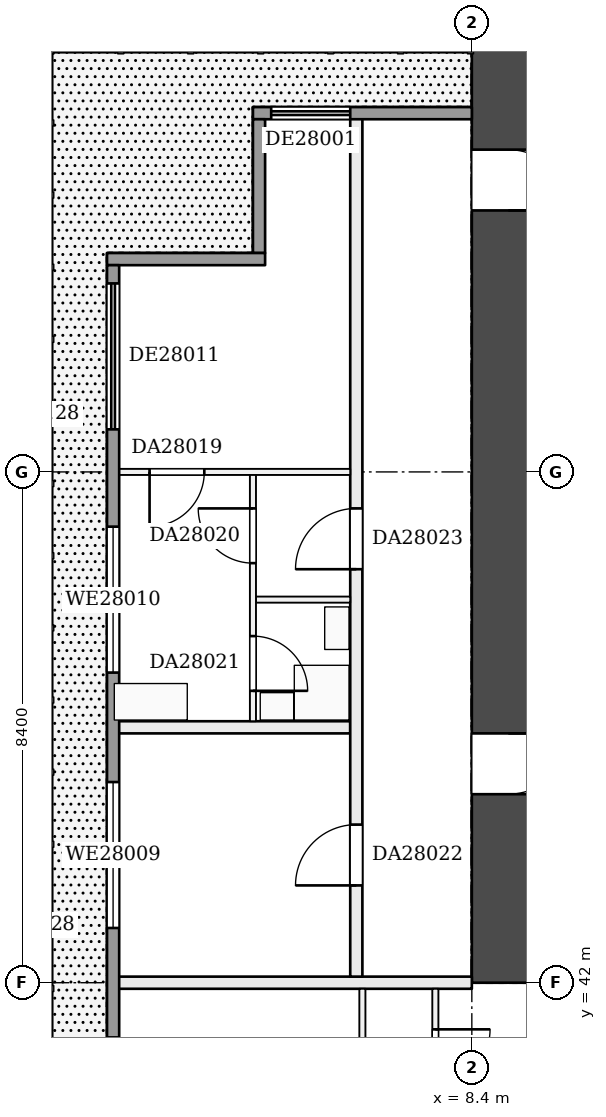
"""IFC4 building model, lengths in metres.
Left out: names, types, materials, properties, quantities, classifications, styles, units other than length and angle.
Written with IfcOpenShell. Run it as: python <this file> out.ifc"""

import sys

from ifc_helpers import new_model, si_unit, direction, frame, frame_2d, origin, place, context, subcontext, project, spatial, rectangle, extrude, element, fill, save


model = new_model("IFC4")
c1 = context("Model", 3, precision=1e-05, world=origin(), true_north=direction((0.0, 1.0)))
c2 = subcontext(c1, "Body", "Model", "MODEL_VIEW")
j1 = project(units=[si_unit("LENGTHUNIT", "METRE"), si_unit("PLANEANGLEUNIT", "RADIAN")], contexts=[c1])
p1 = place(None, origin())
s1 = spatial("IfcSite", under=j1, at=p1, CompositionType="ELEMENT")
p2 = place(p1, origin())
s2 = spatial("IfcBuilding", under=s1, at=p2, CompositionType="ELEMENT")
p3 = place(p2, frame((0.0, 0.0, 112.7)))
s3 = spatial("IfcBuildingStorey", under=s2, at=p3, CompositionType="ELEMENT", Elevation=112.7)
p4 = place(p3, frame((9.0, 58.8, 0.0), z_axis=(0.0, 0.0, 1.0), x_axis=(0.0, -1.0, 0.0)))
e1 = element("IfcWall", 1, at=p4, inside=s3, PredefinedType="SHEAR", context=c2, shape_type="SweptSolid", body=[
    extrude(rectangle(XDim=16.8, YDim=1.2, at=frame_2d((8.4, 0.0))), origin(), (0.0, 0.0, 1.0), 3.22),
])
p5 = place(p4, frame((3.1, 0.0, 0.0)))
e2 = element("IfcOpeningElement", 2, at=p5, cuts=e1, PredefinedType="OPENING", context=c2, shape_type="SweptSolid", body=[
    extrude(rectangle(XDim=1.0, YDim=2.1, at=frame_2d((0.5, 1.05))), frame((0.0, 0.61, 0.0), z_axis=(0.0, -1.0, 0.0), x_axis=(1.0, 0.0, 0.0)), (0.0, 0.0, 1.0), 1.22),
])
p6 = place(p4, frame((12.7, 0.0, 0.0)))
e3 = element("IfcOpeningElement", 3, at=p6, cuts=e1, PredefinedType="OPENING", context=c2, shape_type="SweptSolid", body=[
    extrude(rectangle(XDim=1.0, YDim=2.1, at=frame_2d((0.5, 1.05))), frame((0.0, 0.61, 0.0), z_axis=(0.0, -1.0, 0.0), x_axis=(1.0, 0.0, 0.0)), (0.0, 0.0, 1.0), 1.22),
])
p7 = place(p3, frame((2.5, 42.0, 0.0), z_axis=(0.0, 0.0, 1.0), x_axis=(1.0, 0.0, 0.0)))
e4 = element("IfcWall", 4, at=p7, inside=s3, PredefinedType="PARTITIONING", context=c2, shape_type="SweptSolid", body=[
    extrude(rectangle(XDim=5.9, YDim=0.2, at=frame_2d((2.95, 0.0))), origin(), (0.0, 0.0, 1.0), 3.22),
])
p8 = place(p3, frame((2.5, 46.2, 0.0), z_axis=(0.0, 0.0, 1.0), x_axis=(1.0, 0.0, 0.0)))
e5 = element("IfcWall", 5, at=p8, inside=s3, PredefinedType="PARTITIONING", context=c2, shape_type="SweptSolid", body=[
    extrude(rectangle(XDim=3.9, YDim=0.2, at=frame_2d((1.95, 0.0))), origin(), (0.0, 0.0, 1.0), 3.22),
])
p9 = place(p3, frame((4.85, 48.3, 0.0), z_axis=(0.0, 0.0, 1.0), x_axis=(1.0, 0.0, 0.0)))
e6 = element("IfcWall", 6, at=p9, inside=s3, PredefinedType="PARTITIONING", context=c2, shape_type="SweptSolid", body=[
    extrude(rectangle(XDim=1.55, YDim=0.1, at=frame_2d((0.775, 0.0))), origin(), (0.0, 0.0, 1.0), 3.22),
])
p10 = place(p3, frame((2.5, 50.4, 0.0), z_axis=(0.0, 0.0, 1.0), x_axis=(1.0, 0.0, 0.0)))
e7 = element("IfcWall", 7, at=p10, inside=s3, PredefinedType="PARTITIONING", context=c2, shape_type="SweptSolid", body=[
    extrude(rectangle(XDim=3.9, YDim=0.1, at=frame_2d((1.95, 0.0))), origin(), (0.0, 0.0, 1.0), 3.22),
])
p11 = place(p10, frame((0.6, 0.0, 0.0)))
e8 = element("IfcOpeningElement", 8, at=p11, cuts=e7, PredefinedType="OPENING", context=c2, shape_type="SweptSolid", body=[
    extrude(rectangle(XDim=0.9, YDim=2.1, at=frame_2d((0.45, 1.05))), frame((0.0, 0.06, 0.0), z_axis=(0.0, -1.0, 0.0), x_axis=(1.0, 0.0, 0.0)), (0.0, 0.0, 1.0), 0.12),
])
p12 = place(p3, frame((4.8, 46.3, 0.0), z_axis=(0.0, 0.0, 1.0), x_axis=(0.0, 1.0, 0.0)))
e9 = element("IfcWall", 9, at=p12, inside=s3, PredefinedType="PARTITIONING", context=c2, shape_type="SweptSolid", body=[
    extrude(rectangle(XDim=4.05, YDim=0.1, at=frame_2d((2.025, 0.0))), origin(), (0.0, 0.0, 1.0), 3.22),
])
p13 = place(p12, frame((2.6, 0.0, 0.0)))
e10 = element("IfcOpeningElement", 10, at=p13, cuts=e9, PredefinedType="OPENING", context=c2, shape_type="SweptSolid", body=[
    extrude(rectangle(XDim=0.9, YDim=2.1, at=frame_2d((0.45, 1.05))), frame((0.0, 0.06, 0.0), z_axis=(0.0, -1.0, 0.0), x_axis=(1.0, 0.0, 0.0)), (0.0, 0.0, 1.0), 0.12),
])
p14 = place(p12, frame((0.5, 0.0, 0.0)))
e11 = element("IfcOpeningElement", 11, at=p14, cuts=e9, PredefinedType="OPENING", context=c2, shape_type="SweptSolid", body=[
    extrude(rectangle(XDim=0.9, YDim=2.1, at=frame_2d((0.45, 1.05))), frame((0.0, 0.06, 0.0), z_axis=(0.0, -1.0, 0.0), x_axis=(1.0, 0.0, 0.0)), (0.0, 0.0, 1.0), 0.12),
])
p15 = place(p3, frame((6.5, 42.1, 0.0), z_axis=(0.0, 0.0, 1.0), x_axis=(0.0, 1.0, 0.0)))
e12 = element("IfcWall", 12, at=p15, inside=s3, PredefinedType="PARTITIONING", context=c2, shape_type="SweptSolid", body=[
    extrude(rectangle(XDim=14.2, YDim=0.2, at=frame_2d((7.1, 0.0))), origin(), (0.0, 0.0, 1.0), 3.22),
])
p16 = place(p15, frame((1.5, 0.0, 0.0)))
e13 = element("IfcOpeningElement", 13, at=p16, cuts=e12, PredefinedType="OPENING", context=c2, shape_type="SweptSolid", body=[
    extrude(rectangle(XDim=1.0, YDim=2.1, at=frame_2d((0.5, 1.05))), frame((0.0, 0.11, 0.0), z_axis=(0.0, -1.0, 0.0), x_axis=(1.0, 0.0, 0.0)), (0.0, 0.0, 1.0), 0.22),
])
p17 = place(p15, frame((6.7, 0.0, 0.0)))
e14 = element("IfcOpeningElement", 14, at=p17, cuts=e12, PredefinedType="OPENING", context=c2, shape_type="SweptSolid", body=[
    extrude(rectangle(XDim=1.0, YDim=2.1, at=frame_2d((0.5, 1.05))), frame((0.0, 0.11, 0.0), z_axis=(0.0, -1.0, 0.0), x_axis=(1.0, 0.0, 0.0)), (0.0, 0.0, 1.0), 0.22),
])
p18 = place(p3, frame((6.6, 16.85, 0.0), z_axis=(0.0, 0.0, 1.0), x_axis=(0.0, 1.0, 0.0)))
e15 = element("IfcWall", 15, at=p18, inside=s3, PredefinedType="PARTITIONING", context=c2, shape_type="SweptSolid", body=[
    extrude(rectangle(XDim=25.05, YDim=0.1, at=frame_2d((12.525, 0.0))), origin(), (0.0, 0.0, 1.0), 3.22),
])
p19 = place(p18, frame((1.55, 0.0, 0.0)))
e16 = element("IfcOpeningElement", 16, at=p19, cuts=e15, PredefinedType="OPENING", context=c2, shape_type="SweptSolid", body=[
    extrude(rectangle(XDim=0.9, YDim=2.1, at=frame_2d((0.45, 1.05))), frame((0.0, 0.06, 0.0), z_axis=(0.0, -1.0, 0.0), x_axis=(1.0, 0.0, 0.0)), (0.0, 0.0, 1.0), 0.12),
])
p20 = place(p18, frame((7.15, 0.0, 0.0)))
e17 = element("IfcOpeningElement", 17, at=p20, cuts=e15, PredefinedType="OPENING", context=c2, shape_type="SweptSolid", body=[
    extrude(rectangle(XDim=0.9, YDim=2.1, at=frame_2d((0.45, 1.05))), frame((0.0, 0.06, 0.0), z_axis=(0.0, -1.0, 0.0), x_axis=(1.0, 0.0, 0.0)), (0.0, 0.0, 1.0), 0.12),
])
p21 = place(p18, frame((14.15, 0.0, 0.0)))
e18 = element("IfcOpeningElement", 18, at=p21, cuts=e15, PredefinedType="OPENING", context=c2, shape_type="SweptSolid", body=[
    extrude(rectangle(XDim=0.9, YDim=2.1, at=frame_2d((0.45, 1.05))), frame((0.0, 0.06, 0.0), z_axis=(0.0, -1.0, 0.0), x_axis=(1.0, 0.0, 0.0)), (0.0, 0.0, 1.0), 0.12),
])
p22 = place(p18, frame((18.35, 0.0, 0.0)))
e19 = element("IfcOpeningElement", 19, at=p22, cuts=e15, PredefinedType="OPENING", context=c2, shape_type="SweptSolid", body=[
    extrude(rectangle(XDim=0.9, YDim=2.1, at=frame_2d((0.45, 1.05))), frame((0.0, 0.06, 0.0), z_axis=(0.0, -1.0, 0.0), x_axis=(1.0, 0.0, 0.0)), (0.0, 0.0, 1.0), 0.12),
])
p23 = place(p18, frame((22.55, 0.0, 0.0)))
e20 = element("IfcOpeningElement", 20, at=p23, cuts=e15, PredefinedType="OPENING", context=c2, shape_type="SweptSolid", body=[
    extrude(rectangle(XDim=0.9, YDim=2.1, at=frame_2d((0.45, 1.05))), frame((0.0, 0.06, 0.0), z_axis=(0.0, -1.0, 0.0), x_axis=(1.0, 0.0, 0.0)), (0.0, 0.0, 1.0), 0.12),
])
p24 = place(p3, frame((7.8, 33.7, 0.0), z_axis=(0.0, 0.0, 1.0), x_axis=(0.0, 1.0, 0.0)))
e21 = element("IfcWall", 21, at=p24, inside=s3, PredefinedType="PARTITIONING", context=c2, shape_type="SweptSolid", body=[
    extrude(rectangle(XDim=8.2, YDim=0.1, at=frame_2d((4.1, 0.0))), origin(), (0.0, 0.0, 1.0), 3.22),
])
p25 = place(p24, frame((6.633, 0.0, 0.0)))
e22 = element("IfcOpeningElement", 22, at=p25, cuts=e21, PredefinedType="OPENING", context=c2, shape_type="SweptSolid", body=[
    extrude(rectangle(XDim=0.9, YDim=2.1, at=frame_2d((0.45, 1.05))), frame((0.0, 0.06, 0.0), z_axis=(0.0, -1.0, 0.0), x_axis=(1.0, 0.0, 0.0)), (0.0, 0.0, 1.0), 0.12),
])
p26 = place(p24, frame((0.8, 0.0, 0.0)))
e23 = element("IfcOpeningElement", 23, at=p26, cuts=e21, PredefinedType="OPENING", context=c2, shape_type="SweptSolid", body=[
    extrude(rectangle(XDim=0.9, YDim=2.1, at=frame_2d((0.45, 1.05))), frame((0.0, 0.06, 0.0), z_axis=(0.0, -1.0, 0.0), x_axis=(1.0, 0.0, 0.0)), (0.0, 0.0, 1.0), 0.12),
])
p27 = place(p24, frame((3.767, 0.0, 0.0)))
e24 = element("IfcOpeningElement", 24, at=p27, cuts=e21, PredefinedType="OPENING", context=c2, shape_type="SweptSolid", body=[
    extrude(rectangle(XDim=0.9, YDim=2.1, at=frame_2d((0.45, 1.05))), frame((0.0, 0.06, 0.0), z_axis=(0.0, -1.0, 0.0), x_axis=(1.0, 0.0, 0.0)), (0.0, 0.0, 1.0), 0.12),
])
p28 = place(p3, frame((8.4, 56.3, 0.0), z_axis=(0.0, 0.0, 1.0), x_axis=(-1.0, 0.0, 0.0)))
e25 = element("IfcWall", 25, at=p28, inside=s3, PredefinedType="SOLIDWALL", context=c2, shape_type="SweptSolid", body=[
    extrude(rectangle(XDim=3.6, YDim=0.2, at=frame_2d((1.8, 0.0))), origin(), (0.0, 0.0, 1.0), 3.22),
])
p29 = place(p28, frame((2.0, 0.0, 0.0)))
e26 = element("IfcOpeningElement", 26, at=p29, cuts=e25, PredefinedType="OPENING", context=c2, shape_type="SweptSolid", body=[
    extrude(rectangle(XDim=1.3, YDim=2.2, at=frame_2d((0.65, 1.1))), frame((0.0, 0.11, 0.0), z_axis=(0.0, -1.0, 0.0), x_axis=(1.0, 0.0, 0.0)), (0.0, 0.0, 1.0), 0.22),
])
p30 = place(p3, frame((4.9, 56.2, 0.0), z_axis=(0.0, 0.0, 1.0), x_axis=(0.0, -1.0, 0.0)))
e27 = element("IfcWall", 27, at=p30, inside=s3, PredefinedType="SOLIDWALL", context=c2, shape_type="SweptSolid", body=[
    extrude(rectangle(XDim=2.2, YDim=0.2, at=frame_2d((1.1, 0.0))), origin(), (0.0, 0.0, 1.0), 3.22),
])
p31 = place(p3, frame((5.0, 53.9, 0.0), z_axis=(0.0, 0.0, 1.0), x_axis=(-1.0, 0.0, 0.0)))
e28 = element("IfcWall", 28, at=p31, inside=s3, PredefinedType="SOLIDWALL", context=c2, shape_type="SweptSolid", body=[
    extrude(rectangle(XDim=2.6, YDim=0.2, at=frame_2d((1.3, 0.0))), origin(), (0.0, 0.0, 1.0), 3.22),
])
p32 = place(p3, frame((2.5, 53.8, 0.0), z_axis=(0.0, 0.0, 1.0), x_axis=(0.0, -1.0, 0.0)))
e29 = element("IfcWall", 29, at=p32, inside=s3, PredefinedType="SOLIDWALL", context=c2, shape_type="SweptSolid", body=[
    extrude(rectangle(XDim=40.4, YDim=0.2, at=frame_2d((20.2, 0.0))), origin(), (0.0, 0.0, 1.0), 3.22),
])
p33 = place(p32, frame((37.7, 0.0, 0.9)))
e30 = element("IfcOpeningElement", 30, at=p33, cuts=e29, PredefinedType="OPENING", context=c2, shape_type="SweptSolid", body=[
    extrude(rectangle(XDim=2.4, YDim=1.5, at=frame_2d((1.2, 0.75))), frame((0.0, 0.11, 0.0), z_axis=(0.0, -1.0, 0.0), x_axis=(1.0, 0.0, 0.0)), (0.0, 0.0, 1.0), 0.22),
])
p34 = place(p32, frame((33.7, 0.0, 0.9)))
e31 = element("IfcOpeningElement", 31, at=p34, cuts=e29, PredefinedType="OPENING", context=c2, shape_type="SweptSolid", body=[
    extrude(rectangle(XDim=2.4, YDim=1.5, at=frame_2d((1.2, 0.75))), frame((0.0, 0.11, 0.0), z_axis=(0.0, -1.0, 0.0), x_axis=(1.0, 0.0, 0.0)), (0.0, 0.0, 1.0), 0.22),
])
p35 = place(p32, frame((29.5, 0.0, 0.0)))
e32 = element("IfcOpeningElement", 32, at=p35, cuts=e29, PredefinedType="OPENING", context=c2, shape_type="SweptSolid", body=[
    extrude(rectangle(XDim=2.4, YDim=2.2, at=frame_2d((1.2, 1.1))), frame((0.0, 0.11, 0.0), z_axis=(0.0, -1.0, 0.0), x_axis=(1.0, 0.0, 0.0)), (0.0, 0.0, 1.0), 0.22),
])
p36 = place(p32, frame((25.3, 0.0, 0.0)))
e33 = element("IfcOpeningElement", 33, at=p36, cuts=e29, PredefinedType="OPENING", context=c2, shape_type="SweptSolid", body=[
    extrude(rectangle(XDim=2.4, YDim=2.2, at=frame_2d((1.2, 1.1))), frame((0.0, 0.11, 0.0), z_axis=(0.0, -1.0, 0.0), x_axis=(1.0, 0.0, 0.0)), (0.0, 0.0, 1.0), 0.22),
])
p37 = place(p32, frame((21.1, 0.0, 0.9)))
e34 = element("IfcOpeningElement", 34, at=p37, cuts=e29, PredefinedType="OPENING", context=c2, shape_type="SweptSolid", body=[
    extrude(rectangle(XDim=2.4, YDim=1.5, at=frame_2d((1.2, 0.75))), frame((0.0, 0.11, 0.0), z_axis=(0.0, -1.0, 0.0), x_axis=(1.0, 0.0, 0.0)), (0.0, 0.0, 1.0), 0.22),
])
p38 = place(p32, frame((16.9, 0.0, 0.0)))
e35 = element("IfcOpeningElement", 35, at=p38, cuts=e29, PredefinedType="OPENING", context=c2, shape_type="SweptSolid", body=[
    extrude(rectangle(XDim=2.4, YDim=2.2, at=frame_2d((1.2, 1.1))), frame((0.0, 0.11, 0.0), z_axis=(0.0, -1.0, 0.0), x_axis=(1.0, 0.0, 0.0)), (0.0, 0.0, 1.0), 0.22),
])
p39 = place(p32, frame((12.7, 0.0, 0.9)))
e36 = element("IfcOpeningElement", 36, at=p39, cuts=e29, PredefinedType="OPENING", context=c2, shape_type="SweptSolid", body=[
    extrude(rectangle(XDim=2.4, YDim=1.5, at=frame_2d((1.2, 0.75))), frame((0.0, 0.11, 0.0), z_axis=(0.0, -1.0, 0.0), x_axis=(1.0, 0.0, 0.0)), (0.0, 0.0, 1.0), 0.22),
])
p40 = place(p32, frame((8.5, 0.0, 0.9)))
e37 = element("IfcOpeningElement", 37, at=p40, cuts=e29, PredefinedType="OPENING", context=c2, shape_type="SweptSolid", body=[
    extrude(rectangle(XDim=2.4, YDim=1.5, at=frame_2d((1.2, 0.75))), frame((0.0, 0.11, 0.0), z_axis=(0.0, -1.0, 0.0), x_axis=(1.0, 0.0, 0.0)), (0.0, 0.0, 1.0), 0.22),
])
p41 = place(p32, frame((4.3, 0.0, 0.9)))
e38 = element("IfcOpeningElement", 38, at=p41, cuts=e29, PredefinedType="OPENING", context=c2, shape_type="SweptSolid", body=[
    extrude(rectangle(XDim=2.4, YDim=1.5, at=frame_2d((1.2, 0.75))), frame((0.0, 0.11, 0.0), z_axis=(0.0, -1.0, 0.0), x_axis=(1.0, 0.0, 0.0)), (0.0, 0.0, 1.0), 0.22),
])
p42 = place(p32, frame((0.3, 0.0, 0.0)))
e39 = element("IfcOpeningElement", 39, at=p42, cuts=e29, PredefinedType="OPENING", context=c2, shape_type="SweptSolid", body=[
    extrude(rectangle(XDim=2.4, YDim=2.2, at=frame_2d((1.2, 1.1))), frame((0.0, 0.11, 0.0), z_axis=(0.0, -1.0, 0.0), x_axis=(1.0, 0.0, 0.0)), (0.0, 0.0, 1.0), 0.22),
])
p43 = place(p5, origin())
e40 = element("IfcDoor", 40, at=p43, inside=s3, OperationType="SINGLE_SWING_RIGHT", PredefinedType="DOOR", context=c2, shape_type="SweptSolid", body=[
    extrude(rectangle(XDim=1.0, YDim=2.1, at=frame_2d((0.5, 1.05))), frame((0.0, 0.025, 0.0), z_axis=(0.0, -1.0, 0.0), x_axis=(1.0, 0.0, 0.0)), (0.0, 0.0, 1.0), 0.05),
])
fill(e2, e40)
p44 = place(p6, origin())
e41 = element("IfcDoor", 41, at=p44, inside=s3, OperationType="SINGLE_SWING_LEFT", PredefinedType="DOOR", context=c2, shape_type="SweptSolid", body=[
    extrude(rectangle(XDim=1.0, YDim=2.1, at=frame_2d((0.5, 1.05))), frame((0.0, 0.025, 0.0), z_axis=(0.0, -1.0, 0.0), x_axis=(1.0, 0.0, 0.0)), (0.0, 0.0, 1.0), 0.05),
])
fill(e3, e41)
p45 = place(p11, frame((0.9, 0.0, 0.0), z_axis=(0.0, 0.0, 1.0), x_axis=(-1.0, 0.0, 0.0)))
e42 = element("IfcDoor", 42, at=p45, inside=s3, OperationType="SINGLE_SWING_RIGHT", PredefinedType="DOOR", context=c2, shape_type="SweptSolid", body=[
    extrude(rectangle(XDim=0.9, YDim=2.1, at=frame_2d((0.45, 1.05))), frame((0.0, 0.025, 0.0), z_axis=(0.0, -1.0, 0.0), x_axis=(1.0, 0.0, 0.0)), (0.0, 0.0, 1.0), 0.05),
])
fill(e8, e42)
p46 = place(p13, origin())
e43 = element("IfcDoor", 43, at=p46, inside=s3, OperationType="SINGLE_SWING_RIGHT", PredefinedType="DOOR", context=c2, shape_type="SweptSolid", body=[
    extrude(rectangle(XDim=0.9, YDim=2.1, at=frame_2d((0.45, 1.05))), frame((0.0, 0.025, 0.0), z_axis=(0.0, -1.0, 0.0), x_axis=(1.0, 0.0, 0.0)), (0.0, 0.0, 1.0), 0.05),
])
fill(e10, e43)
p47 = place(p14, frame((0.9, 0.0, 0.0), z_axis=(0.0, 0.0, 1.0), x_axis=(-1.0, 0.0, 0.0)))
e44 = element("IfcDoor", 44, at=p47, inside=s3, OperationType="SINGLE_SWING_RIGHT", PredefinedType="DOOR", context=c2, shape_type="SweptSolid", body=[
    extrude(rectangle(XDim=0.9, YDim=2.1, at=frame_2d((0.45, 1.05))), frame((0.0, 0.025, 0.0), z_axis=(0.0, -1.0, 0.0), x_axis=(1.0, 0.0, 0.0)), (0.0, 0.0, 1.0), 0.05),
])
fill(e11, e44)
p48 = place(p16, origin())
e45 = element("IfcDoor", 45, at=p48, inside=s3, OperationType="SINGLE_SWING_LEFT", PredefinedType="DOOR", context=c2, shape_type="SweptSolid", body=[
    extrude(rectangle(XDim=1.0, YDim=2.1, at=frame_2d((0.5, 1.05))), frame((0.0, 0.025, 0.0), z_axis=(0.0, -1.0, 0.0), x_axis=(1.0, 0.0, 0.0)), (0.0, 0.0, 1.0), 0.05),
])
fill(e13, e45)
p49 = place(p17, origin())
e46 = element("IfcDoor", 46, at=p49, inside=s3, OperationType="SINGLE_SWING_LEFT", PredefinedType="DOOR", context=c2, shape_type="SweptSolid", body=[
    extrude(rectangle(XDim=1.0, YDim=2.1, at=frame_2d((0.5, 1.05))), frame((0.0, 0.025, 0.0), z_axis=(0.0, -1.0, 0.0), x_axis=(1.0, 0.0, 0.0)), (0.0, 0.0, 1.0), 0.05),
])
fill(e14, e46)
p50 = place(p25, frame((0.9, 0.0, 0.0), z_axis=(0.0, 0.0, 1.0), x_axis=(-1.0, 0.0, 0.0)))
e47 = element("IfcDoor", 47, at=p50, inside=s3, OperationType="SINGLE_SWING_LEFT", PredefinedType="DOOR", context=c2, shape_type="SweptSolid", body=[
    extrude(rectangle(XDim=0.9, YDim=2.1, at=frame_2d((0.45, 1.05))), frame((0.0, 0.025, 0.0), z_axis=(0.0, -1.0, 0.0), x_axis=(1.0, 0.0, 0.0)), (0.0, 0.0, 1.0), 0.05),
])
fill(e22, e47)
p51 = place(p29, origin())
e48 = element("IfcDoor", 48, at=p51, inside=s3, OperationType="DOUBLE_DOOR_SLIDING", PredefinedType="DOOR", context=c2, shape_type="SweptSolid", body=[
    extrude(rectangle(XDim=1.3, YDim=2.2, at=frame_2d((0.65, 1.1))), frame((0.0, 0.025, 0.0), z_axis=(0.0, -1.0, 0.0), x_axis=(1.0, 0.0, 0.0)), (0.0, 0.0, 1.0), 0.05),
])
fill(e26, e48)
p52 = place(p40, origin())
e49 = element("IfcWindow", 49, at=p52, inside=s3, PartitioningType="SINGLE_PANEL", PredefinedType="WINDOW", context=c2, shape_type="SweptSolid", body=[
    extrude(rectangle(XDim=2.4, YDim=1.5, at=frame_2d((1.2, 0.75))), frame((0.0, 0.03, 0.0), z_axis=(0.0, -1.0, 0.0), x_axis=(1.0, 0.0, 0.0)), (0.0, 0.0, 1.0), 0.06),
])
fill(e37, e49)
p53 = place(p41, origin())
e50 = element("IfcWindow", 50, at=p53, inside=s3, PartitioningType="SINGLE_PANEL", PredefinedType="WINDOW", context=c2, shape_type="SweptSolid", body=[
    extrude(rectangle(XDim=2.4, YDim=1.5, at=frame_2d((1.2, 0.75))), frame((0.0, 0.03, 0.0), z_axis=(0.0, -1.0, 0.0), x_axis=(1.0, 0.0, 0.0)), (0.0, 0.0, 1.0), 0.06),
])
fill(e38, e50)
p54 = place(p42, origin())
e51 = element("IfcDoor", 51, at=p54, inside=s3, OperationType="DOUBLE_DOOR_SLIDING", PredefinedType="DOOR", context=c2, shape_type="SweptSolid", body=[
    extrude(rectangle(XDim=2.4, YDim=2.2, at=frame_2d((1.2, 1.1))), frame((0.0, 0.025, 0.0), z_axis=(0.0, -1.0, 0.0), x_axis=(1.0, 0.0, 0.0)), (0.0, 0.0, 1.0), 0.05),
])
fill(e39, e51)
save(model, sys.argv[1])
